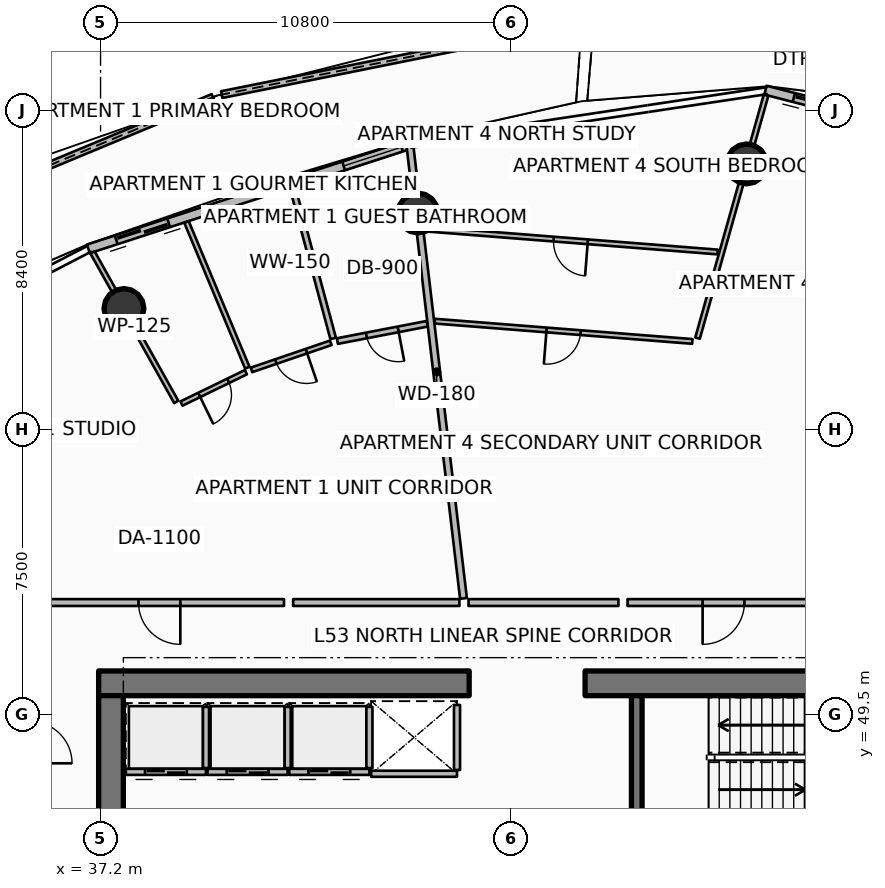
"""IFC4 building model, lengths in metres.
Left out: names, types, materials, properties, quantities, classifications, styles, units other than length and angle.
Written with IfcOpenShell. Run it as: python <this file> out.ifc"""

import sys

from ifc_helpers import new_model, si_unit, direction, frame, frame_2d, origin, origin_2d, place, context, subcontext, project, spatial, polyline, rectangle, circle, outline, extrude, element, fill, save


model = new_model("IFC4")
c1 = context("Model", 3, precision=1e-05, world=origin(), true_north=direction((0.0, 1.0)))
c2 = subcontext(c1, "Body", "Model", "MODEL_VIEW")
j1 = project(units=[si_unit("LENGTHUNIT", "METRE"), si_unit("PLANEANGLEUNIT", "RADIAN")], contexts=[c1])
p1 = place(None, origin())
s1 = spatial("IfcSite", under=j1, at=p1, CompositionType="ELEMENT")
p2 = place(p1, origin())
s2 = spatial("IfcBuilding", under=s1, at=p2, CompositionType="ELEMENT")
p3 = place(p2, frame((0.0, 0.0, 210.3)))
s3 = spatial("IfcBuildingStorey", under=s2, at=p3, CompositionType="ELEMENT", Elevation=210.3)
for number, where, z_axis, x_axis in (
    (1, (37.15, 50.325, 0.0), (0.0, 0.0, 1.0), (1.0, 0.0, 0.0)),
    (2, (49.95, 50.325, 0.0), (0.0, 0.0, 1.0), (1.0, 0.0, 0.0)),
):
    element("IfcWall", number, at=place(p3, frame(where, z_axis=z_axis, x_axis=x_axis)), inside=s3, PredefinedType="SHEAR", context=c2, shape_type="SweptSolid", body=[
        extrude(rectangle(XDim=9.75, YDim=0.65, at=frame_2d((4.875, 0.0))), origin(), (0.0, 0.0, 1.0), 3.75),
    ])
p4 = place(p3, frame((37.475, 34.0, 0.0), z_axis=(0.0, 0.0, 1.0), x_axis=(0.0, 1.0, 0.0)))
e3 = element("IfcWall", 3, at=p4, inside=s3, PredefinedType="SHEAR", context=c2, shape_type="SweptSolid", body=[
    extrude(rectangle(XDim=16.0, YDim=0.65, at=frame_2d((8.0, 0.0))), origin(), (0.0, 0.0, 1.0), 3.75),
])
p5 = place(p3, frame((51.31, 46.5, 0.0), z_axis=(0.0, 0.0, 1.0), x_axis=(0.0, 1.0, 0.0)))
e4 = element("IfcWall", 4, at=p5, inside=s3, PredefinedType="SHEAR", context=c2, shape_type="SweptSolid", body=[
    extrude(rectangle(XDim=3.5, YDim=0.28, at=frame_2d((1.75, 0.0))), origin(), (0.0, 0.0, 1.0), 3.75),
])
for number, where, z_axis, x_axis in (
    (5, (54.202, 63.992, 0.0), (0.0, 0.0, 1.0), (1.0, 0.0, 0.0)),
    (6, (45.55, 62.7, 0.0), (0.0, 0.0, 1.0), (1.0, 0.0, 0.0)),
    (7, (37.815, 60.186, 0.0), (0.0, 0.0, 1.0), (1.0, 0.0, 0.0)),
):
    element("IfcColumn", number, at=place(p3, frame(where, z_axis=z_axis, x_axis=x_axis)), inside=s3, PredefinedType="COLUMN", context=c2, shape_type="SweptSolid", body=[
        extrude(circle(Radius=0.525, at=origin_2d()), origin(), (0.0, 0.0, 1.0), 3.5),
    ])
p6 = place(p3, frame((60.529, 66.834, 0.0), z_axis=(0.0, 0.0, 1.0), x_axis=(-0.996118216942, 0.088025552404, 0.0)))
e8 = element("IfcWall", 8, at=p6, inside=s3, PredefinedType="PARAPET", context=c2, shape_type="SweptSolid", body=[
    extrude(outline(polyline([(0.0, 0.0), (10.384, 0.0), (10.384, 1.483), (5.192, 1.284), (0.0, 1.148), (0.0, 0.0)])), frame((0.0, 0.09, 0.0), z_axis=(0.0, -1.0, 0.0), x_axis=(1.0, 0.0, 0.0)), (0.0, 0.0, 1.0), 0.18),
])
p7 = place(p3, frame((49.866, 67.721, 0.0), z_axis=(0.0, 0.0, 1.0), x_axis=(-0.980371313285, -0.197160057028, 0.0)))
e9 = element("IfcWall", 9, at=p7, inside=s3, PredefinedType="PARAPET", context=c2, shape_type="SweptSolid", body=[
    extrude(outline(polyline([(0.0, 0.0), (9.668, 0.0), (9.668, 1.832), (4.834, 1.696), (0.0, 1.497), (0.0, 0.0)])), frame((0.0, 0.09, 0.0), z_axis=(0.0, -1.0, 0.0), x_axis=(1.0, 0.0, 0.0)), (0.0, 0.0, 1.0), 0.18),
])
p8 = place(p3, frame((40.159, 65.745, 0.0), z_axis=(0.0, 0.0, 1.0), x_axis=(-0.923266030552, -0.38416121203, 0.0)))
e10 = element("IfcWall", 10, at=p8, inside=s3, PredefinedType="PARAPET", context=c2, shape_type="SweptSolid", body=[
    extrude(outline(polyline([(0.0, 0.0), (9.772, 0.0), (9.772, 1.756), (4.886, 1.853), (0.0, 1.832), (0.0, 0.0)])), frame((0.0, 0.09, 0.0), z_axis=(0.0, -1.0, 0.0), x_axis=(1.0, 0.0, 0.0)), (0.0, 0.0, 1.0), 0.18),
])
p9 = place(p3, frame((64.86, 63.313, 0.0), z_axis=(0.0, 0.0, 1.0), x_axis=(-0.968374028006, 0.249502989727, 0.0)))
e11 = element("IfcWall", 11, at=p9, inside=s3, PredefinedType="SOLIDWALL", context=c2, shape_type="SweptSolid", body=[
    extrude(rectangle(XDim=10.494, YDim=0.24, at=frame_2d((5.247, 0.0))), origin(), (0.0, 0.0, 1.0), 2.45),
])
p10 = place(p9, frame((8.274, 0.0, 0.0)))
e12 = element("IfcOpeningElement", 12, at=p10, cuts=e11, PredefinedType="OPENING", context=c2, shape_type="SweptSolid", body=[
    extrude(rectangle(XDim=1.45, YDim=2.15, at=frame_2d((0.725, 1.075))), frame((0.0, 0.13, 0.0), z_axis=(0.0, -1.0, 0.0), x_axis=(1.0, 0.0, 0.0)), (0.0, 0.0, 1.0), 0.26),
])
p11 = place(p9, frame((0.28, 0.0, 0.65)))
e13 = element("IfcOpeningElement", 13, at=p11, cuts=e11, PredefinedType="OPENING", context=c2, shape_type="SweptSolid", body=[
    extrude(rectangle(XDim=1.6, YDim=1.5, at=frame_2d((0.8, 0.75))), frame((0.0, 0.13, 0.0), z_axis=(0.0, -1.0, 0.0), x_axis=(1.0, 0.0, 0.0)), (0.0, 0.0, 1.0), 0.26),
])
p12 = place(p3, frame((45.384, 64.519, 0.0), z_axis=(0.0, 0.0, 1.0), x_axis=(-0.951058543936, -0.309010753869, 0.0)))
e14 = element("IfcWall", 14, at=p12, inside=s3, PredefinedType="SOLIDWALL", context=c2, shape_type="SweptSolid", body=[
    extrude(rectangle(XDim=8.942, YDim=0.24, at=frame_2d((4.471, 0.0))), origin(), (0.0, 0.0, 1.0), 2.45),
])
p13 = place(p12, frame((6.722, 0.0, 0.0)))
e15 = element("IfcOpeningElement", 15, at=p13, cuts=e14, PredefinedType="OPENING", context=c2, shape_type="SweptSolid", body=[
    extrude(rectangle(XDim=1.45, YDim=2.15, at=frame_2d((0.725, 1.075))), frame((0.0, 0.13, 0.0), z_axis=(0.0, -1.0, 0.0), x_axis=(1.0, 0.0, 0.0)), (0.0, 0.0, 1.0), 0.26),
])
p14 = place(p12, frame((0.28, 0.0, 0.65)))
e16 = element("IfcOpeningElement", 16, at=p14, cuts=e14, PredefinedType="OPENING", context=c2, shape_type="SweptSolid", body=[
    extrude(rectangle(XDim=1.6, YDim=1.5, at=frame_2d((0.8, 0.75))), frame((0.0, 0.13, 0.0), z_axis=(0.0, -1.0, 0.0), x_axis=(1.0, 0.0, 0.0)), (0.0, 0.0, 1.0), 0.26),
])
p15 = place(p3, frame((39.975, 47.995, 0.0), z_axis=(0.0, 0.0, 1.0), x_axis=(-1.0, 0.0, 0.0)))
e17 = element("IfcWall", 17, at=p15, inside=s3, PredefinedType="PARTITIONING", context=c2, shape_type="SweptSolid", body=[
    extrude(rectangle(XDim=2.11, YDim=0.16, at=frame_2d((1.055, 0.0))), origin(), (0.0, 0.0, 1.0), 3.5),
])
p16 = place(p15, frame((0.505, 0.0, 0.0)))
e18 = element("IfcOpeningElement", 18, at=p16, cuts=e17, PredefinedType="OPENING", context=c2, shape_type="SweptSolid", body=[
    extrude(rectangle(XDim=1.1, YDim=2.1, at=frame_2d((0.55, 1.05))), frame((0.0, 0.09, 0.0), z_axis=(0.0, -1.0, 0.0), x_axis=(1.0, 0.0, 0.0)), (0.0, 0.0, 1.0), 0.18),
])
p17 = place(p3, frame((39.975, 48.095, 0.0), z_axis=(0.0, 0.0, 1.0), x_axis=(0.0, 1.0, 0.0)))
e19 = element("IfcWall", 19, at=p17, inside=s3, PredefinedType="PARTITIONING", context=c2, shape_type="SweptSolid", body=[
    extrude(rectangle(XDim=1.61, YDim=0.16, at=frame_2d((0.805, 0.0))), origin(), (0.0, 0.0, 1.0), 3.5),
])
p18 = place(p3, frame((42.125, 47.995, 0.0), z_axis=(0.0, 0.0, 1.0), x_axis=(-1.0, 0.0, 0.0)))
e20 = element("IfcWall", 20, at=p18, inside=s3, PredefinedType="PARTITIONING", context=c2, shape_type="SweptSolid", body=[
    extrude(rectangle(XDim=2.11, YDim=0.16, at=frame_2d((1.055, 0.0))), origin(), (0.0, 0.0, 1.0), 3.5),
])
p19 = place(p18, frame((0.505, 0.0, 0.0)))
e21 = element("IfcOpeningElement", 21, at=p19, cuts=e20, PredefinedType="OPENING", context=c2, shape_type="SweptSolid", body=[
    extrude(rectangle(XDim=1.1, YDim=2.1, at=frame_2d((0.55, 1.05))), frame((0.0, 0.09, 0.0), z_axis=(0.0, -1.0, 0.0), x_axis=(1.0, 0.0, 0.0)), (0.0, 0.0, 1.0), 0.18),
])
p20 = place(p3, frame((42.125, 48.095, 0.0), z_axis=(0.0, 0.0, 1.0), x_axis=(0.0, 1.0, 0.0)))
e22 = element("IfcWall", 22, at=p20, inside=s3, PredefinedType="PARTITIONING", context=c2, shape_type="SweptSolid", body=[
    extrude(rectangle(XDim=1.61, YDim=0.16, at=frame_2d((0.805, 0.0))), origin(), (0.0, 0.0, 1.0), 3.5),
])
p21 = place(p3, frame((44.275, 47.995, 0.0), z_axis=(0.0, 0.0, 1.0), x_axis=(-1.0, 0.0, 0.0)))
e23 = element("IfcWall", 23, at=p21, inside=s3, PredefinedType="PARTITIONING", context=c2, shape_type="SweptSolid", body=[
    extrude(rectangle(XDim=2.11, YDim=0.16, at=frame_2d((1.055, 0.0))), origin(), (0.0, 0.0, 1.0), 3.5),
])
p22 = place(p21, frame((0.505, 0.0, 0.0)))
e24 = element("IfcOpeningElement", 24, at=p22, cuts=e23, PredefinedType="OPENING", context=c2, shape_type="SweptSolid", body=[
    extrude(rectangle(XDim=1.1, YDim=2.1, at=frame_2d((0.55, 1.05))), frame((0.0, 0.09, 0.0), z_axis=(0.0, -1.0, 0.0), x_axis=(1.0, 0.0, 0.0)), (0.0, 0.0, 1.0), 0.18),
])
p23 = place(p3, frame((44.275, 48.095, 0.0), z_axis=(0.0, 0.0, 1.0), x_axis=(0.0, 1.0, 0.0)))
e25 = element("IfcWall", 25, at=p23, inside=s3, PredefinedType="PARTITIONING", context=c2, shape_type="SweptSolid", body=[
    extrude(rectangle(XDim=1.61, YDim=0.16, at=frame_2d((0.805, 0.0))), origin(), (0.0, 0.0, 1.0), 3.5),
])
p24 = place(p3, frame((46.58, 47.945, 0.0), z_axis=(0.0, 0.0, 1.0), x_axis=(-1.0, 0.0, 0.0)))
e26 = element("IfcWall", 26, at=p24, inside=s3, PredefinedType="PARTITIONING", context=c2, shape_type="SweptSolid", body=[
    extrude(rectangle(XDim=2.26, YDim=0.16, at=frame_2d((1.13, 0.0))), origin(), (0.0, 0.0, 1.0), 3.5),
])
p25 = place(p3, frame((46.58, 48.045, 0.0), z_axis=(0.0, 0.0, 1.0), x_axis=(0.0, 1.0, 0.0)))
e27 = element("IfcWall", 27, at=p25, inside=s3, PredefinedType="PARTITIONING", context=c2, shape_type="SweptSolid", body=[
    extrude(rectangle(XDim=1.71, YDim=0.16, at=frame_2d((0.855, 0.0))), origin(), (0.0, 0.0, 1.0), 3.5),
])
p26 = place(p3, frame((46.75, 52.559, 0.0), z_axis=(0.0, 0.0, 1.0), x_axis=(-0.117528079883, 0.993069559718, 0.0)))
e28 = element("IfcWall", 28, at=p26, inside=s3, PredefinedType="PARTITIONING", context=c2, shape_type="SweptSolid", body=[
    extrude(rectangle(XDim=12.003, YDim=0.18, at=frame_2d((6.001, 0.0))), origin(), (0.0, 0.0, 1.0), 2.94),
])
p27 = place(p3, frame((42.028, 52.45, 0.0), z_axis=(0.0, 0.0, 1.0), x_axis=(-1.0, 0.0, 0.0)))
e29 = element("IfcWall", 29, at=p27, inside=s3, PredefinedType="PARTITIONING", context=c2, shape_type="SweptSolid", body=[
    extrude(rectangle(XDim=6.558, YDim=0.18, at=frame_2d((3.279, 0.0))), origin(), (0.0, 0.0, 1.0), 2.94),
])
p28 = place(p27, frame((2.729, 0.0, 0.0)))
e30 = element("IfcOpeningElement", 30, at=p28, cuts=e29, PredefinedType="OPENING", context=c2, shape_type="SweptSolid", body=[
    extrude(rectangle(XDim=1.1, YDim=2.1, at=frame_2d((0.55, 1.05))), frame((0.0, 0.1, 0.0), z_axis=(0.0, -1.0, 0.0), x_axis=(1.0, 0.0, 0.0)), (0.0, 0.0, 1.0), 0.2),
])
p29 = place(p3, frame((46.643, 52.45, 0.0), z_axis=(0.0, 0.0, 1.0), x_axis=(-1.0, 0.0, 0.0)))
e31 = element("IfcWall", 31, at=p29, inside=s3, PredefinedType="PARTITIONING", context=c2, shape_type="SweptSolid", body=[
    extrude(rectangle(XDim=4.376, YDim=0.18, at=frame_2d((2.188, 0.0))), origin(), (0.0, 0.0, 1.0), 2.94),
])
p30 = place(p3, frame((39.191, 57.729, 0.0), z_axis=(0.0, 0.0, 1.0), x_axis=(-0.48860171964, 0.872506939551, 0.0)))
e32 = element("IfcWall", 32, at=p30, inside=s3, PredefinedType="PARTITIONING", context=c2, shape_type="SweptSolid", body=[
    extrude(rectangle(XDim=4.508, YDim=0.125, at=frame_2d((2.254, 0.0))), origin(), (0.0, 0.0, 1.0), 2.94),
])
p31 = place(p3, frame((45.795, 59.785, 0.0), z_axis=(0.0, 0.0, 1.0), x_axis=(-0.981945593386, -0.189163557882, 0.0)))
e33 = element("IfcWall", 33, at=p31, inside=s3, PredefinedType="PARTITIONING", context=c2, shape_type="SweptSolid", body=[
    extrude(rectangle(XDim=2.406, YDim=0.15, at=frame_2d((1.203, 0.0))), origin(), (0.0, 0.0, 1.0), 2.94),
])
p32 = place(p31, frame((0.778, 0.0, 0.0)))
e34 = element("IfcOpeningElement", 34, at=p32, cuts=e33, PredefinedType="OPENING", context=c2, shape_type="SweptSolid", body=[
    extrude(rectangle(XDim=0.85, YDim=2.06, at=frame_2d((0.425, 1.03))), frame((0.0, 0.085, 0.0), z_axis=(0.0, -1.0, 0.0), x_axis=(1.0, 0.0, 0.0)), (0.0, 0.0, 1.0), 0.17),
])
p33 = place(p3, frame((43.321, 59.4, 0.0), z_axis=(0.0, 0.0, 1.0), x_axis=(-0.259683834326, 0.9656936917, 0.0)))
e35 = element("IfcWall", 35, at=p33, inside=s3, PredefinedType="PARTITIONING", context=c2, shape_type="SweptSolid", body=[
    extrude(rectangle(XDim=4.111, YDim=0.15, at=frame_2d((2.056, 0.0))), origin(), (0.0, 0.0, 1.0), 2.94),
])
p34 = place(p3, frame((41.062, 58.629, 0.0), z_axis=(0.0, 0.0, 1.0), x_axis=(-0.385086773066, 0.922880369934, 0.0)))
e36 = element("IfcWall", 36, at=p34, inside=s3, PredefinedType="PARTITIONING", context=c2, shape_type="SweptSolid", body=[
    extrude(rectangle(XDim=4.155, YDim=0.125, at=frame_2d((2.078, 0.0))), origin(), (0.0, 0.0, 1.0), 2.94),
])
p35 = place(p3, frame((43.259, 59.284, 0.0), z_axis=(0.0, 0.0, 1.0), x_axis=(-0.946366372143, -0.323095480743, 0.0)))
e37 = element("IfcWall", 37, at=p35, inside=s3, PredefinedType="PARTITIONING", context=c2, shape_type="SweptSolid", body=[
    extrude(rectangle(XDim=2.205, YDim=0.125, at=frame_2d((1.103, 0.0))), origin(), (0.0, 0.0, 1.0), 2.94),
])
p36 = place(p35, frame((0.677, 0.0, 0.0)))
e38 = element("IfcOpeningElement", 38, at=p36, cuts=e37, PredefinedType="OPENING", context=c2, shape_type="SweptSolid", body=[
    extrude(rectangle(XDim=0.85, YDim=2.06, at=frame_2d((0.425, 1.03))), frame((0.0, 0.073, 0.0), z_axis=(0.0, -1.0, 0.0), x_axis=(1.0, 0.0, 0.0)), (0.0, 0.0, 1.0), 0.145),
])
p37 = place(p3, frame((41.024, 58.51, 0.0), z_axis=(0.0, 0.0, 1.0), x_axis=(-0.899168967124, -0.437601609414, 0.0)))
e39 = element("IfcWall", 39, at=p37, inside=s3, PredefinedType="PARTITIONING", context=c2, shape_type="SweptSolid", body=[
    extrude(rectangle(XDim=1.885, YDim=0.125, at=frame_2d((0.942, 0.0))), origin(), (0.0, 0.0, 1.0), 2.94),
])
p38 = place(p37, frame((0.517, 0.0, 0.0)))
e40 = element("IfcOpeningElement", 40, at=p38, cuts=e39, PredefinedType="OPENING", context=c2, shape_type="SweptSolid", body=[
    extrude(rectangle(XDim=0.85, YDim=2.06, at=frame_2d((0.425, 1.03))), frame((0.0, 0.073, 0.0), z_axis=(0.0, -1.0, 0.0), x_axis=(1.0, 0.0, 0.0)), (0.0, 0.0, 1.0), 0.145),
])
p39 = place(p3, frame((56.118, 52.45, 0.0), z_axis=(0.0, 0.0, 1.0), x_axis=(-1.0, 0.0, 0.0)))
e41 = element("IfcWall", 41, at=p39, inside=s3, PredefinedType="PARTITIONING", context=c2, shape_type="SweptSolid", body=[
    extrude(rectangle(XDim=5.051, YDim=0.18, at=frame_2d((2.525, 0.0))), origin(), (0.0, 0.0, 1.0), 2.94),
])
p40 = place(p39, frame((1.975, 0.0, 0.0)))
e42 = element("IfcOpeningElement", 42, at=p40, cuts=e41, PredefinedType="OPENING", context=c2, shape_type="SweptSolid", body=[
    extrude(rectangle(XDim=1.1, YDim=2.1, at=frame_2d((0.55, 1.05))), frame((0.0, 0.1, 0.0), z_axis=(0.0, -1.0, 0.0), x_axis=(1.0, 0.0, 0.0)), (0.0, 0.0, 1.0), 0.2),
])
p41 = place(p3, frame((50.827, 52.45, 0.0), z_axis=(0.0, 0.0, 1.0), x_axis=(-1.0, 0.0, 0.0)))
e43 = element("IfcWall", 43, at=p41, inside=s3, PredefinedType="PARTITIONING", context=c2, shape_type="SweptSolid", body=[
    extrude(rectangle(XDim=3.944, YDim=0.18, at=frame_2d((1.972, 0.0))), origin(), (0.0, 0.0, 1.0), 2.94),
])
p42 = place(p3, frame((52.909, 59.408, 0.0), z_axis=(0.0, 0.0, 1.0), x_axis=(0.271461038327, 0.962449429669, 0.0)))
e44 = element("IfcWall", 44, at=p42, inside=s3, PredefinedType="PARTITIONING", context=c2, shape_type="SweptSolid", body=[
    extrude(rectangle(XDim=6.64, YDim=0.125, at=frame_2d((3.32, 0.0))), origin(), (0.0, 0.0, 1.0), 2.94),
])
p43 = place(p3, frame((52.773, 59.32, 0.0), z_axis=(0.0, 0.0, 1.0), x_axis=(-0.996916436686, 0.078470492963, 0.0)))
e45 = element("IfcWall", 45, at=p43, inside=s3, PredefinedType="PARTITIONING", context=c2, shape_type="SweptSolid", body=[
    extrude(rectangle(XDim=6.798, YDim=0.125, at=frame_2d((3.399, 0.0))), origin(), (0.0, 0.0, 1.0), 2.94),
])
p44 = place(p43, frame((2.949, 0.0, 0.0)))
e46 = element("IfcOpeningElement", 46, at=p44, cuts=e45, PredefinedType="OPENING", context=c2, shape_type="SweptSolid", body=[
    extrude(rectangle(XDim=0.9, YDim=2.08, at=frame_2d((0.45, 1.04))), frame((0.0, 0.073, 0.0), z_axis=(0.0, -1.0, 0.0), x_axis=(1.0, 0.0, 0.0)), (0.0, 0.0, 1.0), 0.145),
])
p45 = place(p3, frame((53.436, 61.674, 0.0), z_axis=(0.0, 0.0, 1.0), x_axis=(-0.996917885084, 0.078452089838, 0.0)))
e47 = element("IfcWall", 47, at=p45, inside=s3, PredefinedType="PARTITIONING", context=c2, shape_type="SweptSolid", body=[
    extrude(rectangle(XDim=7.752, YDim=0.125, at=frame_2d((3.876, 0.0))), origin(), (0.0, 0.0, 1.0), 2.94),
])
p46 = place(p45, frame((3.426, 0.0, 0.0)))
e48 = element("IfcOpeningElement", 48, at=p46, cuts=e47, PredefinedType="OPENING", context=c2, shape_type="SweptSolid", body=[
    extrude(rectangle(XDim=0.9, YDim=2.08, at=frame_2d((0.45, 1.04))), frame((0.0, 0.073, 0.0), z_axis=(0.0, -1.0, 0.0), x_axis=(1.0, 0.0, 0.0)), (0.0, 0.0, 1.0), 0.145),
])
p47 = place(p10, origin())
e49 = element("IfcDoor", 49, at=p47, inside=s3, OperationType="DOUBLE_DOOR_SLIDING", PredefinedType="DOOR", context=c2, shape_type="SweptSolid", body=[
    extrude(rectangle(XDim=1.45, YDim=2.15, at=frame_2d((0.725, 1.075))), frame((0.0, 0.025, 0.0), z_axis=(0.0, -1.0, 0.0), x_axis=(1.0, 0.0, 0.0)), (0.0, 0.0, 1.0), 0.05),
])
fill(e12, e49)
p48 = place(p13, origin())
e50 = element("IfcDoor", 50, at=p48, inside=s3, OperationType="DOUBLE_DOOR_SLIDING", PredefinedType="DOOR", context=c2, shape_type="SweptSolid", body=[
    extrude(rectangle(XDim=1.45, YDim=2.15, at=frame_2d((0.725, 1.075))), frame((0.0, 0.025, 0.0), z_axis=(0.0, -1.0, 0.0), x_axis=(1.0, 0.0, 0.0)), (0.0, 0.0, 1.0), 0.05),
])
fill(e15, e50)
p49 = place(p14, origin())
e51 = element("IfcWindow", 51, at=p49, inside=s3, PartitioningType="SINGLE_PANEL", PredefinedType="WINDOW", context=c2, shape_type="SweptSolid", body=[
    extrude(rectangle(XDim=1.6, YDim=1.5, at=frame_2d((0.8, 0.75))), frame((0.0, 0.03, 0.0), z_axis=(0.0, -1.0, 0.0), x_axis=(1.0, 0.0, 0.0)), (0.0, 0.0, 1.0), 0.06),
])
fill(e16, e51)
p50 = place(p16, origin())
e52 = element("IfcDoor", 52, at=p50, inside=s3, OperationType="DOUBLE_DOOR_SLIDING", PredefinedType="DOOR", context=c2, shape_type="SweptSolid", body=[
    extrude(rectangle(XDim=1.1, YDim=2.1, at=frame_2d((0.55, 1.05))), frame((0.0, 0.025, 0.0), z_axis=(0.0, -1.0, 0.0), x_axis=(1.0, 0.0, 0.0)), (0.0, 0.0, 1.0), 0.05),
])
fill(e18, e52)
p51 = place(p19, origin())
e53 = element("IfcDoor", 53, at=p51, inside=s3, OperationType="DOUBLE_DOOR_SLIDING", PredefinedType="DOOR", context=c2, shape_type="SweptSolid", body=[
    extrude(rectangle(XDim=1.1, YDim=2.1, at=frame_2d((0.55, 1.05))), frame((0.0, 0.025, 0.0), z_axis=(0.0, -1.0, 0.0), x_axis=(1.0, 0.0, 0.0)), (0.0, 0.0, 1.0), 0.05),
])
fill(e21, e53)
p52 = place(p22, origin())
e54 = element("IfcDoor", 54, at=p52, inside=s3, OperationType="DOUBLE_DOOR_SLIDING", PredefinedType="DOOR", context=c2, shape_type="SweptSolid", body=[
    extrude(rectangle(XDim=1.1, YDim=2.1, at=frame_2d((0.55, 1.05))), frame((0.0, 0.025, 0.0), z_axis=(0.0, -1.0, 0.0), x_axis=(1.0, 0.0, 0.0)), (0.0, 0.0, 1.0), 0.05),
])
fill(e24, e54)
p53 = place(p28, origin())
e55 = element("IfcDoor", 55, at=p53, inside=s3, OperationType="SINGLE_SWING_LEFT", PredefinedType="DOOR", context=c2, shape_type="SweptSolid", body=[
    extrude(rectangle(XDim=1.1, YDim=2.1, at=frame_2d((0.55, 1.05))), frame((0.0, 0.025, 0.0), z_axis=(0.0, -1.0, 0.0), x_axis=(1.0, 0.0, 0.0)), (0.0, 0.0, 1.0), 0.05),
])
fill(e30, e55)
p54 = place(p32, origin())
e56 = element("IfcDoor", 56, at=p54, inside=s3, OperationType="SINGLE_SWING_LEFT", PredefinedType="DOOR", context=c2, shape_type="SweptSolid", body=[
    extrude(rectangle(XDim=0.85, YDim=2.06, at=frame_2d((0.425, 1.03))), frame((0.0, 0.025, 0.0), z_axis=(0.0, -1.0, 0.0), x_axis=(1.0, 0.0, 0.0)), (0.0, 0.0, 1.0), 0.05),
])
fill(e34, e56)
p55 = place(p36, origin())
e57 = element("IfcDoor", 57, at=p55, inside=s3, OperationType="SINGLE_SWING_LEFT", PredefinedType="DOOR", context=c2, shape_type="SweptSolid", body=[
    extrude(rectangle(XDim=0.85, YDim=2.06, at=frame_2d((0.425, 1.03))), frame((0.0, 0.025, 0.0), z_axis=(0.0, -1.0, 0.0), x_axis=(1.0, 0.0, 0.0)), (0.0, 0.0, 1.0), 0.05),
])
fill(e38, e57)
p56 = place(p38, origin())
e58 = element("IfcDoor", 58, at=p56, inside=s3, OperationType="SINGLE_SWING_RIGHT", PredefinedType="DOOR", context=c2, shape_type="SweptSolid", body=[
    extrude(rectangle(XDim=0.85, YDim=2.06, at=frame_2d((0.425, 1.03))), frame((0.0, 0.025, 0.0), z_axis=(0.0, -1.0, 0.0), x_axis=(1.0, 0.0, 0.0)), (0.0, 0.0, 1.0), 0.05),
])
fill(e40, e58)
p57 = place(p40, origin())
e59 = element("IfcDoor", 59, at=p57, inside=s3, OperationType="SINGLE_SWING_RIGHT", PredefinedType="DOOR", context=c2, shape_type="SweptSolid", body=[
    extrude(rectangle(XDim=1.1, YDim=2.1, at=frame_2d((0.55, 1.05))), frame((0.0, 0.025, 0.0), z_axis=(0.0, -1.0, 0.0), x_axis=(1.0, 0.0, 0.0)), (0.0, 0.0, 1.0), 0.05),
])
fill(e42, e59)
p58 = place(p44, origin())
e60 = element("IfcDoor", 60, at=p58, inside=s3, OperationType="SINGLE_SWING_RIGHT", PredefinedType="DOOR", context=c2, shape_type="SweptSolid", body=[
    extrude(rectangle(XDim=0.9, YDim=2.08, at=frame_2d((0.45, 1.04))), frame((0.0, 0.025, 0.0), z_axis=(0.0, -1.0, 0.0), x_axis=(1.0, 0.0, 0.0)), (0.0, 0.0, 1.0), 0.05),
])
fill(e46, e60)
p59 = place(p46, origin())
e61 = element("IfcDoor", 61, at=p59, inside=s3, OperationType="SINGLE_SWING_LEFT", PredefinedType="DOOR", context=c2, shape_type="SweptSolid", body=[
    extrude(rectangle(XDim=0.9, YDim=2.08, at=frame_2d((0.45, 1.04))), frame((0.0, 0.025, 0.0), z_axis=(0.0, -1.0, 0.0), x_axis=(1.0, 0.0, 0.0)), (0.0, 0.0, 1.0), 0.05),
])
fill(e48, e61)
save(model, sys.argv[1])
